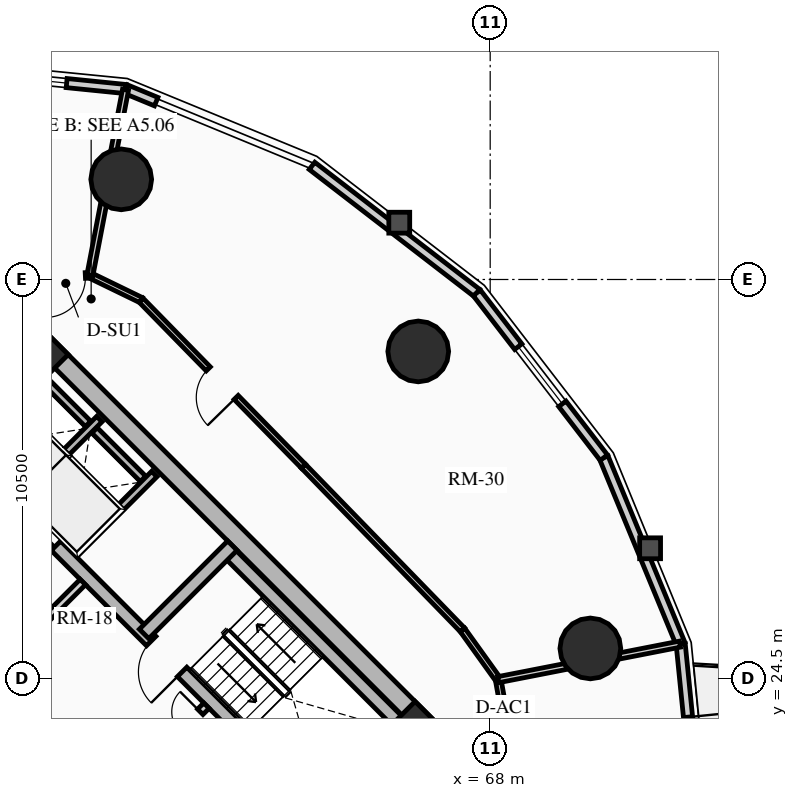
"""IFC4 building model, lengths in metres.
Left out: names, types, materials, properties, quantities, classifications, styles, units other than length and angle.
Written with IfcOpenShell. Run it as: python <this file> out.ifc"""

import sys

from ifc_helpers import new_model, si_unit, direction, frame, frame_2d, origin, origin_2d, place, context, subcontext, project, spatial, rectangle, circle, extrude, source, transform, mapped, element, fill, save


model = new_model("IFC4")
c1 = context("Model", 3, precision=1e-05, world=origin(), true_north=direction((0.0, 1.0)))
c2 = subcontext(c1, "Body", "Model", "MODEL_VIEW")
j1 = project(units=[si_unit("LENGTHUNIT", "METRE"), si_unit("PLANEANGLEUNIT", "RADIAN")], contexts=[c1])
p1 = place(None, origin())
s1 = spatial("IfcSite", under=j1, at=p1, CompositionType="ELEMENT")
p2 = place(p1, origin())
s2 = spatial("IfcBuilding", under=s1, at=p2, CompositionType="ELEMENT")
p3 = place(p2, frame((0.0, 0.0, 24.91)))
s3 = spatial("IfcBuildingStorey", under=s2, at=p3, CompositionType="ELEMENT", Elevation=24.91)
for number, where, z_axis, x_axis in (
    (1, (58.773, 15.661, 0.0), (0.0, 0.0, 1.0), (-0.707, 0.707, 0.0)),
    (2, (66.339, 23.227, 0.0), (0.0, 0.0, 1.0), (-0.707, 0.707, 0.0)),
):
    element("IfcWall", number, at=place(p3, frame(where, z_axis=z_axis, x_axis=x_axis)), inside=s3, PredefinedType="SHEAR", context=c2, shape_type="SweptSolid", body=[
        extrude(rectangle(XDim=14.3, YDim=0.5, at=frame_2d((7.15, 0.0))), origin(), (0.0, 0.0, 1.0), 2.91),
    ])
p4 = place(p3, frame((58.596, 15.838, 0.0), z_axis=(0.0, 0.0, 1.0), x_axis=(0.707106781187, 0.707106781187, 0.0)))
e3 = element("IfcWall", 3, at=p4, inside=s3, PredefinedType="SHEAR", context=c2, shape_type="SweptSolid", body=[
    extrude(rectangle(XDim=10.7, YDim=0.5, at=frame_2d((5.35, 0.0))), origin(), (0.0, 0.0, 1.0), 2.91),
])
m1 = source(origin(), c2, "Body", "SweptSolid", [
    extrude(rectangle(XDim=1.5, YDim=2.02, at=frame_2d((0.75, 1.01))), frame((0.0, 0.26, 0.0), z_axis=(0.0, -1.0, 0.0), x_axis=(1.0, 0.0, 0.0)), (0.0, 0.0, 1.0), 0.52),
])
p5 = place(p4, frame((5.45, 0.0, 0.0)))
e4 = element("IfcOpeningElement", 4, at=p5, cuts=e3, PredefinedType="OPENING", context=c2, shape_type="MappedRepresentation", body=[
    mapped(m1, transform((0.0, 0.0, 0.0), x_axis=(1.0, 0.0, 0.0), y_axis=(0.0, 1.0, 0.0), z_axis=(0.0, 0.0, 1.0), scale=1.0)),
])
p6 = place(p3, frame((48.838, 25.596, 0.0), z_axis=(0.0, 0.0, 1.0), x_axis=(0.707106781187, 0.707106781187, 0.0)))
e5 = element("IfcWall", 5, at=p6, inside=s3, PredefinedType="SHEAR", context=c2, shape_type="SweptSolid", body=[
    extrude(rectangle(XDim=10.7, YDim=0.5, at=frame_2d((5.35, 0.0))), origin(), (0.0, 0.0, 1.0), 2.91),
])
p7 = place(p6, frame((4.6, 0.0, 0.0)))
e6 = element("IfcOpeningElement", 6, at=p7, cuts=e5, PredefinedType="OPENING", context=c2, shape_type="MappedRepresentation", body=[
    mapped(m1, transform((0.0, 0.0, 0.0), x_axis=(1.0, 0.0, 0.0), y_axis=(0.0, 1.0, 0.0), z_axis=(0.0, 0.0, 1.0), scale=1.0)),
])
p8 = place(p3, frame((61.096, 18.338, 0.0), z_axis=(0.0, 0.0, 1.0), x_axis=(-0.707106781187, 0.707106781187, 0.0)))
e7 = element("IfcWall", 7, at=p8, inside=s3, PredefinedType="SHEAR", context=c2, shape_type="SweptSolid", body=[
    extrude(rectangle(XDim=13.8, YDim=0.35, at=frame_2d((6.9, 0.0))), origin(), (0.0, 0.0, 1.0), 2.91),
])
m2 = source(origin(), c2, "Body", "SweptSolid", [
    extrude(rectangle(XDim=1.1, YDim=2.015, at=frame_2d((0.55, 1.007))), frame((0.0, 0.185, 0.0), z_axis=(0.0, -1.0, 0.0), x_axis=(1.0, 0.0, 0.0)), (0.0, 0.0, 1.0), 0.37),
])
p9 = place(p8, frame((4.9, 0.0, 0.0)))
e8 = element("IfcOpeningElement", 8, at=p9, cuts=e7, PredefinedType="OPENING", context=c2, shape_type="MappedRepresentation", body=[
    mapped(m2, transform((0.0, 0.0, 0.0), x_axis=(1.0, 0.0, 0.0), y_axis=(0.0, 1.0, 0.0), z_axis=(0.0, 0.0, 1.0), scale=1.0)),
])
m3 = source(origin(), c2, "Body", "SweptSolid", [
    extrude(rectangle(XDim=1.15, YDim=2.02, at=frame_2d((0.575, 1.01))), frame((0.0, 0.185, 0.0), z_axis=(0.0, -1.0, 0.0), x_axis=(1.0, 0.0, 0.0)), (0.0, 0.0, 1.0), 0.37),
])
p10 = place(p8, frame((7.32, 0.0, 0.0)))
e9 = element("IfcOpeningElement", 9, at=p10, cuts=e7, PredefinedType="OPENING", context=c2, shape_type="MappedRepresentation", body=[
    mapped(m3, transform((0.0, 0.0, 0.0), x_axis=(1.0, 0.0, 0.0), y_axis=(0.0, 1.0, 0.0), z_axis=(0.0, 0.0, 1.0), scale=1.0)),
])
p11 = place(p3, frame((63.662, 20.904, 0.0), z_axis=(0.0, 0.0, 1.0), x_axis=(-0.707106781187, 0.707106781187, 0.0)))
e10 = element("IfcWall", 10, at=p11, inside=s3, PredefinedType="SHEAR", context=c2, shape_type="SweptSolid", body=[
    extrude(rectangle(XDim=13.8, YDim=0.35, at=frame_2d((6.9, 0.0))), origin(), (0.0, 0.0, 1.0), 2.91),
])
p12 = place(p11, frame((10.025, 0.0, 0.0)))
e11 = element("IfcOpeningElement", 11, at=p12, cuts=e10, PredefinedType="OPENING", context=c2, shape_type="MappedRepresentation", body=[
    mapped(m2, transform((0.0, 0.0, 0.0), x_axis=(1.0, 0.0, 0.0), y_axis=(0.0, 1.0, 0.0), z_axis=(0.0, 0.0, 1.0), scale=1.0)),
])
p13 = place(p11, frame((12.025, 0.0, 0.0)))
e12 = element("IfcOpeningElement", 12, at=p13, cuts=e10, PredefinedType="OPENING", context=c2, shape_type="MappedRepresentation", body=[
    mapped(m2, transform((0.0, 0.0, 0.0), x_axis=(1.0, 0.0, 0.0), y_axis=(0.0, 1.0, 0.0), z_axis=(0.0, 0.0, 1.0), scale=1.0)),
])
p14 = place(p11, frame((5.33, 0.0, 0.0)))
e13 = element("IfcOpeningElement", 13, at=p14, cuts=e10, PredefinedType="OPENING", context=c2, shape_type="MappedRepresentation", body=[
    mapped(m3, transform((0.0, 0.0, 0.0), x_axis=(1.0, 0.0, 0.0), y_axis=(0.0, 1.0, 0.0), z_axis=(0.0, 0.0, 1.0), scale=1.0)),
])
p15 = place(p3, frame((65.847, 23.089, 0.0), z_axis=(0.0, 0.0, 1.0), x_axis=(-0.707106781187, 0.707106781187, 0.0)))
e14 = element("IfcWall", 14, at=p15, inside=s3, PredefinedType="SHEAR", context=c2, shape_type="SweptSolid", body=[
    extrude(rectangle(XDim=6.745, YDim=0.35, at=frame_2d((3.373, 0.0))), origin(), (0.0, 0.0, 1.0), 2.91),
])
p16 = place(p3, frame((58.893, 25.674, 0.0), z_axis=(0.0, 0.0, 1.0), x_axis=(0.707106781187, 0.707106781187, 0.0)))
e15 = element("IfcWall", 15, at=p16, inside=s3, PredefinedType="SHEAR", context=c2, shape_type="SweptSolid", body=[
    extrude(rectangle(XDim=3.285, YDim=0.35, at=frame_2d((1.643, 0.0))), origin(), (0.0, 0.0, 1.0), 2.91),
])
for number, where, z_axis, x_axis in (
    (16, (66.024, 23.294, 0.0), (0.0, 0.0, 1.0), (0.707, 0.707, 0.0)),
    (17, (56.294, 33.024, 0.0), (0.0, 0.0, 1.0), (0.707, 0.707, 0.0)),
):
    element("IfcColumn", number, at=place(p3, frame(where, z_axis=z_axis, x_axis=x_axis)), inside=s3, PredefinedType="COLUMN", context=c2, shape_type="SweptSolid", body=[
        extrude(rectangle(XDim=0.85, YDim=0.85, at=origin_2d()), origin(), (0.0, 0.0, 1.0), 2.91),
    ])
for number, where, z_axis, x_axis in (
    (18, (66.107, 33.107, 0.0), (0.0, 0.0, 1.0), (1.0, 0.0, 0.0)),
    (19, (58.291, 37.635, 0.0), (0.0, 0.0, 1.0), (1.0, 0.0, 0.0)),
    (20, (70.635, 25.291, 0.0), (0.0, 0.0, 1.0), (1.0, 0.0, 0.0)),
):
    element("IfcColumn", number, at=place(p3, frame(where, z_axis=z_axis, x_axis=x_axis)), inside=s3, PredefinedType="USERDEFINED", context=c2, shape_type="SweptSolid", body=[
        extrude(circle(Radius=0.8, at=origin_2d()), origin(), (0.0, 0.0, 1.0), 2.91),
    ])
p17 = place(p3, frame((63.312, 37.99, 0.0), z_axis=(0.0, 0.0, 1.0), x_axis=(0.791972010801, -0.610557396243, 0.0)))
e21 = element("IfcWall", 21, at=p17, inside=s3, PredefinedType="SOLIDWALL", context=c2, shape_type="SweptSolid", body=[
    extrude(rectangle(XDim=5.475, YDim=0.24, at=frame_2d((2.737, 0.0))), origin(), (0.0, 0.0, 1.0), 2.073),
])
p18 = place(p3, frame((58.407, 40.012, 0.0), z_axis=(0.0, 0.0, 1.0), x_axis=(0.924556017656, -0.381046152345, 0.0)))
e22 = element("IfcWall", 22, at=p18, inside=s3, PredefinedType="SOLIDWALL", context=c2, shape_type="SweptSolid", body=[
    extrude(rectangle(XDim=0.87, YDim=0.24, at=frame_2d((0.435, 0.0))), origin(), (0.0, 0.0, 1.0), 2.073),
])
p19 = place(p3, frame((53.414, 40.516, 0.0), z_axis=(0.0, 0.0, 1.0), x_axis=(0.994951574538, -0.100356187272, 0.0)))
e23 = element("IfcWall", 23, at=p19, inside=s3, PredefinedType="SOLIDWALL", context=c2, shape_type="SweptSolid", body=[
    extrude(rectangle(XDim=5.019, YDim=0.24, at=frame_2d((2.509, 0.0))), origin(), (0.0, 0.0, 1.0), 2.073),
])
m4 = source(origin(), c2, "Body", "SweptSolid", [
    extrude(rectangle(XDim=1.9, YDim=1.35, at=frame_2d((0.95, 0.675))), frame((0.0, 0.13, 0.0), z_axis=(0.0, -1.0, 0.0), x_axis=(1.0, 0.0, 0.0)), (0.0, 0.0, 1.0), 0.26),
])
p20 = place(p19, frame((1.559, 0.0, 0.65)))
e24 = element("IfcOpeningElement", 24, at=p20, cuts=e23, PredefinedType="OPENING", context=c2, shape_type="MappedRepresentation", body=[
    mapped(m4, transform((0.0, 0.0, 0.0), x_axis=(1.0, 0.0, 0.0), y_axis=(0.0, 1.0, 0.0), z_axis=(0.0, 0.0, 1.0), scale=1.0)),
])
p21 = place(p3, frame((73.012, 25.407, 0.0), z_axis=(0.0, 0.0, 1.0), x_axis=(0.100356187272, -0.994951574538, 0.0)))
e25 = element("IfcWall", 25, at=p21, inside=s3, PredefinedType="SOLIDWALL", context=c2, shape_type="SweptSolid", body=[
    extrude(rectangle(XDim=5.019, YDim=0.24, at=frame_2d((2.509, 0.0))), origin(), (0.0, 0.0, 1.0), 2.073),
])
m5 = source(origin(), c2, "Body", "SweptSolid", [
    extrude(rectangle(XDim=1.15, YDim=2.005, at=frame_2d((0.575, 1.002))), frame((0.0, 0.13, 0.0), z_axis=(0.0, -1.0, 0.0), x_axis=(1.0, 0.0, 0.0)), (0.0, 0.0, 1.0), 0.26),
])
p22 = place(p21, frame((1.934, 0.0, 0.0)))
e26 = element("IfcOpeningElement", 26, at=p22, cuts=e25, PredefinedType="OPENING", context=c2, shape_type="MappedRepresentation", body=[
    mapped(m5, transform((0.0, 0.0, 0.0), x_axis=(1.0, 0.0, 0.0), y_axis=(0.0, 1.0, 0.0), z_axis=(0.0, 0.0, 1.0), scale=1.0)),
])
p23 = place(p3, frame((70.99, 30.312, 0.0), z_axis=(0.0, 0.0, 1.0), x_axis=(0.381113147118, -0.924528403616, 0.0)))
e27 = element("IfcWall", 27, at=p23, inside=s3, PredefinedType="SOLIDWALL", context=c2, shape_type="SweptSolid", body=[
    extrude(rectangle(XDim=5.305, YDim=0.24, at=frame_2d((2.653, 0.0))), origin(), (0.0, 0.0, 1.0), 2.073),
])
p24 = place(p3, frame((67.648, 34.648, 0.0), z_axis=(0.0, 0.0, 1.0), x_axis=(0.610557396243, -0.791972010801, 0.0)))
e28 = element("IfcWall", 28, at=p24, inside=s3, PredefinedType="SOLIDWALL", context=c2, shape_type="SweptSolid", body=[
    extrude(rectangle(XDim=5.475, YDim=0.24, at=frame_2d((2.737, 0.0))), origin(), (0.0, 0.0, 1.0), 2.073),
])
p25 = place(p24, frame((1.787, 0.0, 0.65)))
e29 = element("IfcOpeningElement", 29, at=p25, cuts=e28, PredefinedType="OPENING", context=c2, shape_type="MappedRepresentation", body=[
    mapped(m4, transform((0.0, 0.0, 0.0), x_axis=(1.0, 0.0, 0.0), y_axis=(0.0, 1.0, 0.0), z_axis=(0.0, 0.0, 1.0), scale=1.0)),
])
p26 = place(p3, frame((57.062, 27.781, 0.0), z_axis=(0.0, 0.0, 1.0), x_axis=(0.707106781187, 0.707106781187, 0.0)))
e30 = element("IfcWall", 30, at=p26, inside=s3, PredefinedType="SHEAR", context=c2, shape_type="SweptSolid", body=[
    extrude(rectangle(XDim=2.97, YDim=0.2, at=frame_2d((1.485, 0.0))), origin(), (0.0, 0.0, 1.0), 2.91),
])
p27 = place(p3, frame((55.615, 29.227, 0.0), z_axis=(0.0, 0.0, 1.0), x_axis=(0.707147878904, 0.70706568108, 0.0)))
e31 = element("IfcWall", 31, at=p27, inside=s3, PredefinedType="SHEAR", context=c2, shape_type="SweptSolid", body=[
    extrude(rectangle(XDim=2.97, YDim=0.2, at=frame_2d((1.485, 0.0))), origin(), (0.0, 0.0, 1.0), 2.91),
])
p28 = place(p3, frame((58.865, 29.754, 0.0), z_axis=(0.0, 0.0, 1.0), x_axis=(-0.707174411312, 0.707039144592, 0.0)))
e32 = element("IfcWall", 32, at=p28, inside=s3, PredefinedType="SHEAR", context=c2, shape_type="SweptSolid", body=[
    extrude(rectangle(XDim=1.805, YDim=0.2, at=frame_2d((0.902, 0.0))), origin(), (0.0, 0.0, 1.0), 2.91),
])
p29 = place(p3, frame((57.419, 31.2, 0.0), z_axis=(0.0, 0.0, 1.0), x_axis=(-0.707032117043, 0.707181437447, 0.0)))
e33 = element("IfcWall", 33, at=p29, inside=s3, PredefinedType="SHEAR", context=c2, shape_type="SweptSolid", body=[
    extrude(rectangle(XDim=1.635, YDim=0.2, at=frame_2d((0.817, 0.0))), origin(), (0.0, 0.0, 1.0), 2.91),
])
p30 = place(p3, frame((58.214, 21.467, 0.0), z_axis=(0.0, 0.0, 1.0), x_axis=(0.707106781187, 0.707106781187, 0.0)))
e34 = element("IfcWall", 34, at=p30, inside=s3, PredefinedType="PARTITIONING", context=c2, shape_type="SweptSolid", body=[
    extrude(rectangle(XDim=3.28, YDim=0.2, at=frame_2d((1.64, 0.0))), origin(), (0.0, 0.0, 1.0), 2.635),
])
m6 = source(origin(), c2, "Body", "SweptSolid", [
    extrude(rectangle(XDim=1.5, YDim=2.02, at=frame_2d((0.75, 1.01))), frame((0.0, 0.11, 0.0), z_axis=(0.0, -1.0, 0.0), x_axis=(1.0, 0.0, 0.0)), (0.0, 0.0, 1.0), 0.22),
])
p31 = place(p30, frame((1.55, 0.0, 0.0)))
e35 = element("IfcOpeningElement", 35, at=p31, cuts=e34, PredefinedType="OPENING", context=c2, shape_type="MappedRepresentation", body=[
    mapped(m6, transform((0.0, 0.0, 0.0), x_axis=(1.0, 0.0, 0.0), y_axis=(0.0, 1.0, 0.0), z_axis=(0.0, 0.0, 1.0), scale=1.0)),
])
p32 = place(p3, frame((54.961, 24.719, 0.0), z_axis=(0.0, 0.0, 1.0), x_axis=(0.707106781187, 0.707106781187, 0.0)))
e36 = element("IfcWall", 36, at=p32, inside=s3, PredefinedType="PARTITIONING", context=c2, shape_type="SweptSolid", body=[
    extrude(rectangle(XDim=3.28, YDim=0.2, at=frame_2d((1.64, 0.0))), origin(), (0.0, 0.0, 1.0), 2.635),
])
m7 = source(origin(), c2, "Body", "SweptSolid", [
    extrude(rectangle(XDim=0.9, YDim=2.005, at=frame_2d((0.45, 1.002))), frame((0.0, 0.11, 0.0), z_axis=(0.0, -1.0, 0.0), x_axis=(1.0, 0.0, 0.0)), (0.0, 0.0, 1.0), 0.22),
])
p33 = place(p32, frame((0.16, 0.0, 0.0)))
e37 = element("IfcOpeningElement", 37, at=p33, cuts=e36, PredefinedType="OPENING", context=c2, shape_type="MappedRepresentation", body=[
    mapped(m7, transform((0.0, 0.0, 0.0), x_axis=(1.0, 0.0, 0.0), y_axis=(0.0, 1.0, 0.0), z_axis=(0.0, 0.0, 1.0), scale=1.0)),
])
p34 = place(p3, frame((63.086, 30.086, 0.0), z_axis=(0.0, 0.0, 1.0), x_axis=(-0.699075897379, 0.715047473741, 0.0)))
e38 = element("IfcWall", 38, at=p34, inside=s3, PredefinedType="PARTITIONING", context=c2, shape_type="SweptSolid", body=[
    extrude(rectangle(XDim=6.114, YDim=0.15, at=frame_2d((3.057, 0.0))), origin(), (0.0, 0.0, 1.0), 2.159),
])
m8 = source(origin(), c2, "Body", "SweptSolid", [
    extrude(rectangle(XDim=1.05, YDim=2.015, at=frame_2d((0.525, 1.007))), frame((0.0, 0.085, 0.0), z_axis=(0.0, -1.0, 0.0), x_axis=(1.0, 0.0, 0.0)), (0.0, 0.0, 1.0), 0.17),
])
p35 = place(p34, frame((2.532, 0.0, 0.0)))
e39 = element("IfcOpeningElement", 39, at=p35, cuts=e38, PredefinedType="OPENING", context=c2, shape_type="MappedRepresentation", body=[
    mapped(m8, transform((0.0, 0.0, 0.0), x_axis=(1.0, 0.0, 0.0), y_axis=(0.0, 1.0, 0.0), z_axis=(0.0, 0.0, 1.0), scale=1.0)),
])
p36 = place(p3, frame((58.812, 34.458, 0.0), z_axis=(0.0, 0.0, 1.0), x_axis=(-0.899559490277, 0.436798264021, 0.0)))
e40 = element("IfcWall", 40, at=p36, inside=s3, PredefinedType="PARTITIONING", context=c2, shape_type="SweptSolid", body=[
    extrude(rectangle(XDim=1.495, YDim=0.15, at=frame_2d((0.748, 0.0))), origin(), (0.0, 0.0, 1.0), 2.205),
])
p37 = place(p3, frame((57.467, 35.111, 0.0), z_axis=(0.0, 0.0, 1.0), x_axis=(-0.998691757323, -0.051134859488, 0.0)))
e41 = element("IfcWall", 41, at=p37, inside=s3, PredefinedType="PARTITIONING", context=c2, shape_type="SweptSolid", body=[
    extrude(rectangle(XDim=1.485, YDim=0.15, at=frame_2d((0.742, 0.0))), origin(), (0.0, 0.0, 1.0), 2.159),
])
p38 = place(p37, frame((0.12, 0.0, 0.0)))
e42 = element("IfcOpeningElement", 42, at=p38, cuts=e41, PredefinedType="OPENING", context=c2, shape_type="MappedRepresentation", body=[
    mapped(m8, transform((0.0, 0.0, 0.0), x_axis=(1.0, 0.0, 0.0), y_axis=(0.0, 1.0, 0.0), z_axis=(0.0, 0.0, 1.0), scale=1.0)),
])
p39 = place(p3, frame((68.456, 23.11, 0.0), z_axis=(0.0, 0.0, 1.0), x_axis=(-0.1772522795, 0.984165448191, 0.0)))
e43 = element("IfcWall", 43, at=p39, inside=s3, PredefinedType="PARTITIONING", context=c2, shape_type="SweptSolid", body=[
    extrude(rectangle(XDim=1.382, YDim=0.15, at=frame_2d((0.691, 0.0))), origin(), (0.0, 0.0, 1.0), 2.159),
])
p40 = place(p3, frame((68.211, 24.469, 0.0), z_axis=(0.0, 0.0, 1.0), x_axis=(-0.583012141368, 0.812463441034, 0.0)))
e44 = element("IfcWall", 44, at=p40, inside=s3, PredefinedType="PARTITIONING", context=c2, shape_type="SweptSolid", body=[
    extrude(rectangle(XDim=1.613, YDim=0.15, at=frame_2d((0.807, 0.0))), origin(), (0.0, 0.0, 1.0), 2.205),
])
p41 = place(p3, frame((67.27, 25.78, 0.0), z_axis=(0.0, 0.0, 1.0), x_axis=(-0.696847842907, 0.717218992942, 0.0)))
e45 = element("IfcWall", 45, at=p41, inside=s3, PredefinedType="PARTITIONING", context=c2, shape_type="SweptSolid", body=[
    extrude(rectangle(XDim=6.004, YDim=0.15, at=frame_2d((3.002, 0.0))), origin(), (0.0, 0.0, 1.0), 2.635),
])
p42 = place(p3, frame((57.467, 35.111, 0.0), z_axis=(0.0, 0.0, 1.0), x_axis=(0.188572285328, 0.982059312468, 0.0)))
e46 = element("IfcWall", 46, at=p42, inside=s3, PredefinedType="PARTITIONING", context=c2, shape_type="SweptSolid", body=[
    extrude(rectangle(XDim=4.97, YDim=0.16, at=frame_2d((2.485, 0.0))), origin(), (0.0, 0.0, 1.0), 2.073),
])
p43 = place(p3, frame((68.211, 24.469, 0.0), z_axis=(0.0, 0.0, 1.0), x_axis=(0.981421381452, 0.19186472325, 0.0)))
e47 = element("IfcWall", 47, at=p43, inside=s3, PredefinedType="PARTITIONING", context=c2, shape_type="SweptSolid", body=[
    extrude(rectangle(XDim=4.872, YDim=0.16, at=frame_2d((2.436, 0.0))), origin(), (0.0, 0.0, 1.0), 2.073),
])
m9 = source(origin(), c2, "Body", "SweptSolid", [
    extrude(rectangle(XDim=1.9, YDim=1.35, at=frame_2d((0.95, 0.675))), frame((0.0, 0.03, 0.0), z_axis=(0.0, -1.0, 0.0), x_axis=(1.0, 0.0, 0.0)), (0.0, 0.0, 1.0), 0.06),
])
p44 = place(p20, origin())
e48 = element("IfcWindow", 48, at=p44, inside=s3, PartitioningType="DOUBLE_PANEL_VERTICAL", PredefinedType="WINDOW", context=c2, shape_type="MappedRepresentation", body=[
    mapped(m9, transform((0.0, 0.0, 0.0), x_axis=(1.0, 0.0, 0.0), y_axis=(0.0, 1.0, 0.0), z_axis=(0.0, 0.0, 1.0), scale=1.0)),
])
fill(e24, e48)
m10 = source(origin(), c2, "Body", "SweptSolid", [
    extrude(rectangle(XDim=1.15, YDim=2.005, at=frame_2d((0.575, 1.002))), frame((0.0, 0.025, 0.0), z_axis=(0.0, -1.0, 0.0), x_axis=(1.0, 0.0, 0.0)), (0.0, 0.0, 1.0), 0.05),
])
p45 = place(p22, origin())
e49 = element("IfcDoor", 49, at=p45, inside=s3, OperationType="SINGLE_SWING_LEFT", PredefinedType="DOOR", context=c2, shape_type="MappedRepresentation", body=[
    mapped(m10, transform((0.0, 0.0, 0.0), x_axis=(1.0, 0.0, 0.0), y_axis=(0.0, 1.0, 0.0), z_axis=(0.0, 0.0, 1.0), scale=1.0)),
])
fill(e26, e49)
p46 = place(p25, origin())
e50 = element("IfcWindow", 50, at=p46, inside=s3, PartitioningType="DOUBLE_PANEL_VERTICAL", PredefinedType="WINDOW", context=c2, shape_type="MappedRepresentation", body=[
    mapped(m9, transform((0.0, 0.0, 0.0), x_axis=(1.0, 0.0, 0.0), y_axis=(0.0, 1.0, 0.0), z_axis=(0.0, 0.0, 1.0), scale=1.0)),
])
fill(e29, e50)
m11 = source(origin(), c2, "Body", "SweptSolid", [
    extrude(rectangle(XDim=1.1, YDim=2.015, at=frame_2d((0.55, 1.007))), frame((0.0, 0.025, 0.0), z_axis=(0.0, -1.0, 0.0), x_axis=(1.0, 0.0, 0.0)), (0.0, 0.0, 1.0), 0.05),
])
p47 = place(p12, origin())
e51 = element("IfcDoor", 51, at=p47, inside=s3, OperationType="SLIDING_TO_LEFT", PredefinedType="DOOR", context=c2, shape_type="MappedRepresentation", body=[
    mapped(m11, transform((0.0, 0.0, 0.0), x_axis=(1.0, 0.0, 0.0), y_axis=(0.0, 1.0, 0.0), z_axis=(0.0, 0.0, 1.0), scale=1.0)),
])
fill(e11, e51)
m12 = source(origin(), c2, "Body", "SweptSolid", [
    extrude(rectangle(XDim=1.15, YDim=2.02, at=frame_2d((0.575, 1.01))), frame((0.0, 0.025, 0.0), z_axis=(0.0, -1.0, 0.0), x_axis=(1.0, 0.0, 0.0)), (0.0, 0.0, 1.0), 0.05),
])
p48 = place(p14, origin())
e52 = element("IfcDoor", 52, at=p48, inside=s3, OperationType="SINGLE_SWING_LEFT", PredefinedType="DOOR", context=c2, shape_type="MappedRepresentation", body=[
    mapped(m12, transform((0.0, 0.0, 0.0), x_axis=(1.0, 0.0, 0.0), y_axis=(0.0, 1.0, 0.0), z_axis=(0.0, 0.0, 1.0), scale=1.0)),
])
fill(e13, e52)
m13 = source(origin(), c2, "Body", "SweptSolid", [
    extrude(rectangle(XDim=1.5, YDim=2.02, at=frame_2d((0.75, 1.01))), frame((0.0, 0.025, 0.0), z_axis=(0.0, -1.0, 0.0), x_axis=(1.0, 0.0, 0.0)), (0.0, 0.0, 1.0), 0.05),
])
p49 = place(p31, origin())
e53 = element("IfcDoor", 53, at=p49, inside=s3, OperationType="DOUBLE_DOOR_SINGLE_SWING", PredefinedType="DOOR", context=c2, shape_type="MappedRepresentation", body=[
    mapped(m13, transform((0.0, 0.0, 0.0), x_axis=(1.0, 0.0, 0.0), y_axis=(0.0, 1.0, 0.0), z_axis=(0.0, 0.0, 1.0), scale=1.0)),
])
fill(e35, e53)
m14 = source(origin(), c2, "Body", "SweptSolid", [
    extrude(rectangle(XDim=1.05, YDim=2.015, at=frame_2d((0.525, 1.007))), frame((0.0, 0.025, 0.0), z_axis=(0.0, -1.0, 0.0), x_axis=(1.0, 0.0, 0.0)), (0.0, 0.0, 1.0), 0.05),
])
p50 = place(p38, origin())
e54 = element("IfcDoor", 54, at=p50, inside=s3, OperationType="SINGLE_SWING_RIGHT", PredefinedType="DOOR", context=c2, shape_type="MappedRepresentation", body=[
    mapped(m14, transform((0.0, 0.0, 0.0), x_axis=(1.0, 0.0, 0.0), y_axis=(0.0, 1.0, 0.0), z_axis=(0.0, 0.0, 1.0), scale=1.0)),
])
fill(e42, e54)
p51 = place(p35, origin())
e55 = element("IfcDoor", 55, at=p51, inside=s3, OperationType="SINGLE_SWING_LEFT", PredefinedType="DOOR", context=c2, shape_type="MappedRepresentation", body=[
    mapped(m14, transform((0.0, 0.0, 0.0), x_axis=(1.0, 0.0, 0.0), y_axis=(0.0, 1.0, 0.0), z_axis=(0.0, 0.0, 1.0), scale=1.0)),
])
fill(e39, e55)
save(model, sys.argv[1])
